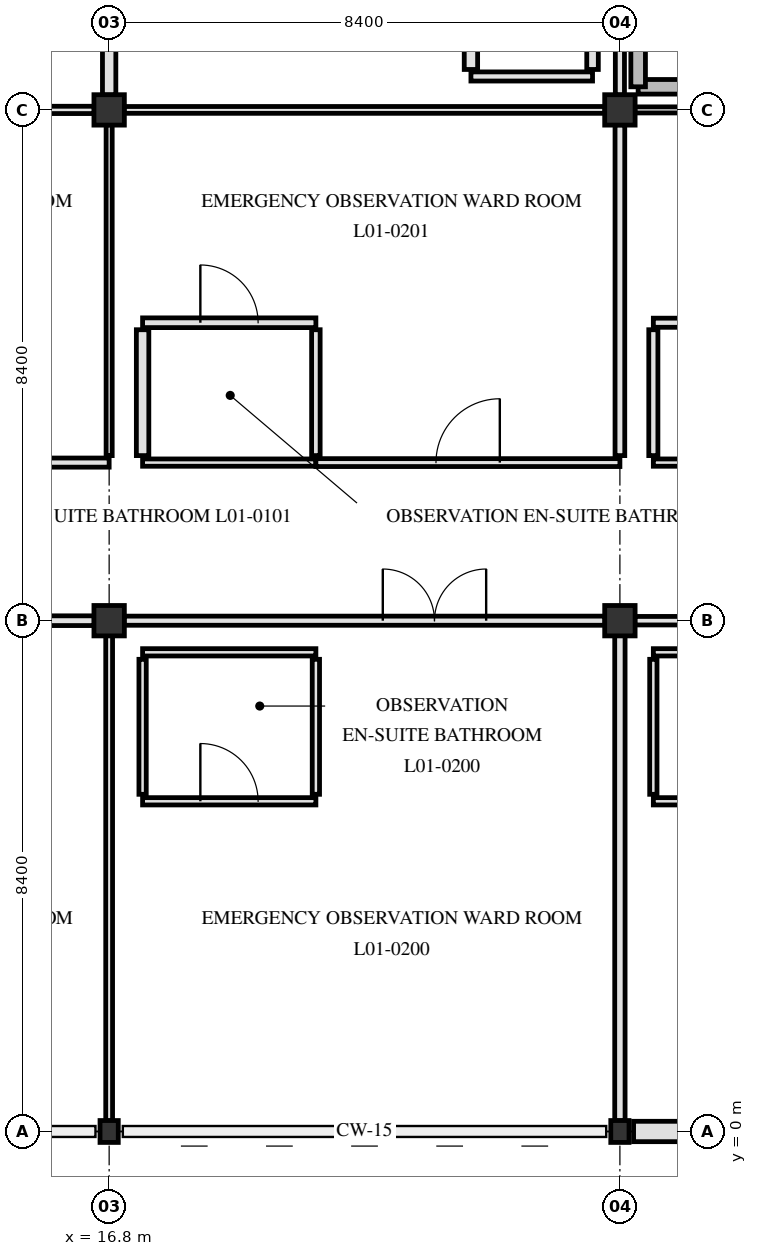
"""IFC4 building model, lengths in metres.
Left out: names, types, materials, properties, quantities, classifications, styles, units other than length and angle.
Written with IfcOpenShell. Run it as: python <this file> out.ifc"""

import sys

from ifc_helpers import new_model, si_unit, direction, frame, frame_2d, origin, origin_2d, place, context, subcontext, project, spatial, rectangle, i_section, extrude, element, fill, save


model = new_model("IFC4")
c1 = context("Model", 3, precision=1e-05, world=origin(), true_north=direction((0.0, 1.0)))
c2 = subcontext(c1, "Body", "Model", "MODEL_VIEW")
j1 = project(units=[si_unit("LENGTHUNIT", "METRE"), si_unit("PLANEANGLEUNIT", "RADIAN")], contexts=[c1])
p1 = place(None, origin())
s1 = spatial("IfcSite", under=j1, at=p1, CompositionType="ELEMENT")
p2 = place(p1, origin())
s2 = spatial("IfcBuilding", under=s1, at=p2, CompositionType="ELEMENT")
p3 = place(p2, frame((0.0, 0.0, 4.8)))
s3 = spatial("IfcBuildingStorey", under=s2, at=p3, CompositionType="ELEMENT", Elevation=4.8)
p4 = place(p3, frame((16.8, 0.0, 0.0), z_axis=(0.0, 0.0, 1.0), x_axis=(1.0, 0.0, 0.0)))
e1 = element("IfcColumn", 1, at=p4, inside=s3, PredefinedType="COLUMN", context=c2, shape_type="SweptSolid", body=[
    extrude(i_section(OverallWidth=0.3, OverallDepth=0.36, WebThickness=0.012, FlangeThickness=0.022, FilletRadius=0.027, at=origin_2d()), origin(), (0.0, 0.0, 1.0), 4.5),
])
for number, where, z_axis, x_axis in (
    (2, (16.8, 8.4, 0.0), (0.0, 0.0, 1.0), (1.0, 0.0, 0.0)),
    (3, (16.8, 16.8, 0.0), (0.0, 0.0, 1.0), (1.0, 0.0, 0.0)),
):
    element("IfcColumn", number, at=place(p3, frame(where, z_axis=z_axis, x_axis=x_axis)), inside=s3, PredefinedType="COLUMN", context=c2, shape_type="SweptSolid", body=[
        extrude(rectangle(XDim=0.5, YDim=0.5, at=origin_2d()), origin(), (0.0, 0.0, 1.0), 4.5),
    ])
p5 = place(p3, frame((25.2, 0.0, 0.0), z_axis=(0.0, 0.0, 1.0), x_axis=(1.0, 0.0, 0.0)))
e4 = element("IfcColumn", 4, at=p5, inside=s3, PredefinedType="COLUMN", context=c2, shape_type="SweptSolid", body=[
    extrude(i_section(OverallWidth=0.3, OverallDepth=0.36, WebThickness=0.012, FlangeThickness=0.022, FilletRadius=0.027, at=origin_2d()), origin(), (0.0, 0.0, 1.0), 4.5),
])
for number, where, z_axis, x_axis in (
    (5, (25.2, 8.4, 0.0), (0.0, 0.0, 1.0), (1.0, 0.0, 0.0)),
    (6, (25.2, 16.8, 0.0), (0.0, 0.0, 1.0), (1.0, 0.0, 0.0)),
):
    element("IfcColumn", number, at=place(p3, frame(where, z_axis=z_axis, x_axis=x_axis)), inside=s3, PredefinedType="COLUMN", context=c2, shape_type="SweptSolid", body=[
        extrude(rectangle(XDim=0.5, YDim=0.5, at=origin_2d()), origin(), (0.0, 0.0, 1.0), 4.5),
    ])
p6 = place(p3, frame((33.375, 0.0, 0.0), z_axis=(0.0, 0.0, 1.0), x_axis=(-1.0, 0.0, 0.0)))
e7 = element("IfcWall", 7, at=p6, inside=s3, PredefinedType="SOLIDWALL", context=c2, shape_type="SweptSolid", body=[
    extrude(rectangle(XDim=7.95, YDim=0.335, at=frame_2d((3.975, 0.0))), origin(), (0.0, 0.0, 1.0), 3.44),
])
p7 = place(p6, frame((1.038, 0.0, 0.85)))
e8 = element("IfcOpeningElement", 8, at=p7, cuts=e7, PredefinedType="OPENING", context=c2, shape_type="SweptSolid", body=[
    extrude(rectangle(XDim=1.9, YDim=1.78, at=frame_2d((0.95, 0.89))), frame((0.0, 0.177, 0.0), z_axis=(0.0, -1.0, 0.0), x_axis=(1.0, 0.0, 0.0)), (0.0, 0.0, 1.0), 0.355),
])
p8 = place(p6, frame((5.488, 0.0, 0.85)))
e9 = element("IfcOpeningElement", 9, at=p8, cuts=e7, PredefinedType="OPENING", context=c2, shape_type="SweptSolid", body=[
    extrude(rectangle(XDim=0.95, YDim=1.3, at=frame_2d((0.475, 0.65))), frame((0.0, 0.177, 0.0), z_axis=(0.0, -1.0, 0.0), x_axis=(1.0, 0.0, 0.0)), (0.0, 0.0, 1.0), 0.355),
])
p9 = place(p3, frame((25.5, 17.18, 0.0), z_axis=(0.0, 0.0, 1.0), x_axis=(1.0, 0.0, 0.0)))
e10 = element("IfcWall", 10, at=p9, inside=s3, PredefinedType="SHEAR", context=c2, shape_type="SweptSolid", body=[
    extrude(rectangle(XDim=7.82, YDim=0.24, at=frame_2d((3.91, 0.0))), origin(), (0.0, 0.0, 1.0), 4.15),
])
p10 = place(p3, frame((25.5, 17.18, 0.0), z_axis=(0.0, 0.0, 1.0), x_axis=(0.0, 1.0, 0.0)))
e11 = element("IfcWall", 11, at=p10, inside=s3, PredefinedType="SHEAR", context=c2, shape_type="SweptSolid", body=[
    extrude(rectangle(XDim=3.32, YDim=0.24, at=frame_2d((1.66, 0.0))), origin(), (0.0, 0.0, 1.0), 4.15),
])
p11 = place(p3, frame((17.35, 5.43, 0.0), z_axis=(0.0, 0.0, 1.0), x_axis=(1.0, 0.0, 0.0)))
e12 = element("IfcWall", 12, at=p11, inside=s3, PredefinedType="PARTITIONING", context=c2, shape_type="SweptSolid", body=[
    extrude(rectangle(XDim=2.85, YDim=0.12, at=frame_2d((1.425, 0.0))), origin(), (0.0, 0.0, 1.0), 4.14),
])
p12 = place(p11, frame((0.95, 0.0, 0.0)))
e13 = element("IfcOpeningElement", 13, at=p12, cuts=e12, PredefinedType="OPENING", context=c2, shape_type="SweptSolid", body=[
    extrude(rectangle(XDim=0.95, YDim=2.1, at=frame_2d((0.475, 1.05))), frame((0.0, 0.07, 0.0), z_axis=(0.0, -1.0, 0.0), x_axis=(1.0, 0.0, 0.0)), (0.0, 0.0, 1.0), 0.14),
])
p13 = place(p3, frame((25.75, 5.43, 0.0), z_axis=(0.0, 0.0, 1.0), x_axis=(1.0, 0.0, 0.0)))
e14 = element("IfcWall", 14, at=p13, inside=s3, PredefinedType="PARTITIONING", context=c2, shape_type="SweptSolid", body=[
    extrude(rectangle(XDim=2.85, YDim=0.12, at=frame_2d((1.425, 0.0))), origin(), (0.0, 0.0, 1.0), 4.14),
])
p14 = place(p13, frame((0.95, 0.0, 0.0)))
e15 = element("IfcOpeningElement", 15, at=p14, cuts=e14, PredefinedType="OPENING", context=c2, shape_type="SweptSolid", body=[
    extrude(rectangle(XDim=0.95, YDim=2.1, at=frame_2d((0.475, 1.05))), frame((0.0, 0.07, 0.0), z_axis=(0.0, -1.0, 0.0), x_axis=(1.0, 0.0, 0.0)), (0.0, 0.0, 1.0), 0.14),
])
p15 = place(p3, frame((17.35, 7.88, 0.0), z_axis=(0.0, 0.0, 1.0), x_axis=(1.0, 0.0, 0.0)))
e16 = element("IfcWall", 16, at=p15, inside=s3, PredefinedType="PARTITIONING", context=c2, shape_type="SweptSolid", body=[
    extrude(rectangle(XDim=2.85, YDim=0.12, at=frame_2d((1.425, 0.0))), origin(), (0.0, 0.0, 1.0), 4.14),
])
p16 = place(p3, frame((25.75, 7.88, 0.0), z_axis=(0.0, 0.0, 1.0), x_axis=(1.0, 0.0, 0.0)))
e17 = element("IfcWall", 17, at=p16, inside=s3, PredefinedType="PARTITIONING", context=c2, shape_type="SweptSolid", body=[
    extrude(rectangle(XDim=2.85, YDim=0.12, at=frame_2d((1.425, 0.0))), origin(), (0.0, 0.0, 1.0), 4.14),
])
p17 = place(p3, frame((8.645, 8.4, 0.0), z_axis=(0.0, 0.0, 1.0), x_axis=(1.0, 0.0, 0.0)))
e18 = element("IfcWall", 18, at=p17, inside=s3, PredefinedType="PARTITIONING", context=c2, shape_type="SweptSolid", body=[
    extrude(rectangle(XDim=7.91, YDim=0.16, at=frame_2d((3.955, 0.0))), origin(), (0.0, 0.0, 1.0), 3.54),
])
p18 = place(p17, frame((4.285, 0.0, 0.0)))
e19 = element("IfcOpeningElement", 19, at=p18, cuts=e18, PredefinedType="OPENING", context=c2, shape_type="SweptSolid", body=[
    extrude(rectangle(XDim=1.64, YDim=2.28, at=frame_2d((0.82, 1.14))), frame((0.0, 0.09, 0.0), z_axis=(0.0, -1.0, 0.0), x_axis=(1.0, 0.0, 0.0)), (0.0, 0.0, 1.0), 0.18),
])
p19 = place(p3, frame((17.045, 8.4, 0.0), z_axis=(0.0, 0.0, 1.0), x_axis=(1.0, 0.0, 0.0)))
e20 = element("IfcWall", 20, at=p19, inside=s3, PredefinedType="PARTITIONING", context=c2, shape_type="SweptSolid", body=[
    extrude(rectangle(XDim=7.91, YDim=0.15, at=frame_2d((3.955, 0.0))), origin(), (0.0, 0.0, 1.0), 3.54),
])
p20 = place(p19, frame((4.256, 0.0, 0.0)))
e21 = element("IfcOpeningElement", 21, at=p20, cuts=e20, PredefinedType="OPENING", context=c2, shape_type="SweptSolid", body=[
    extrude(rectangle(XDim=1.7, YDim=2.25, at=frame_2d((0.85, 1.125))), frame((0.0, 0.085, 0.0), z_axis=(0.0, -1.0, 0.0), x_axis=(1.0, 0.0, 0.0)), (0.0, 0.0, 1.0), 0.17),
])
p21 = place(p3, frame((25.445, 8.4, 0.0), z_axis=(0.0, 0.0, 1.0), x_axis=(1.0, 0.0, 0.0)))
e22 = element("IfcWall", 22, at=p21, inside=s3, PredefinedType="PARTITIONING", context=c2, shape_type="SweptSolid", body=[
    extrude(rectangle(XDim=7.91, YDim=0.14, at=frame_2d((3.955, 0.0))), origin(), (0.0, 0.0, 1.0), 3.54),
])
p22 = place(p21, frame((3.465, 0.0, 0.0)))
e23 = element("IfcOpeningElement", 23, at=p22, cuts=e22, PredefinedType="OPENING", context=c2, shape_type="SweptSolid", body=[
    extrude(rectangle(XDim=0.98, YDim=2.12, at=frame_2d((0.49, 1.06))), frame((0.0, 0.08, 0.0), z_axis=(0.0, -1.0, 0.0), x_axis=(1.0, 0.0, 0.0)), (0.0, 0.0, 1.0), 0.16),
])
p23 = place(p3, frame((11.8, 11.0, 0.0), z_axis=(0.0, 0.0, 1.0), x_axis=(1.0, 0.0, 0.0)))
e24 = element("IfcWall", 24, at=p23, inside=s3, PredefinedType="PARTITIONING", context=c2, shape_type="SweptSolid", body=[
    extrude(rectangle(XDim=5.0, YDim=0.15, at=frame_2d((2.5, 0.0))), origin(), (0.0, 0.0, 1.0), 3.59),
])
p24 = place(p23, frame((1.58, 0.0, 0.0)))
e25 = element("IfcOpeningElement", 25, at=p24, cuts=e24, PredefinedType="OPENING", context=c2, shape_type="SweptSolid", body=[
    extrude(rectangle(XDim=1.84, YDim=2.28, at=frame_2d((0.92, 1.14))), frame((0.0, 0.085, 0.0), z_axis=(0.0, -1.0, 0.0), x_axis=(1.0, 0.0, 0.0)), (0.0, 0.0, 1.0), 0.17),
])
p25 = place(p3, frame((17.35, 11.0, 0.0), z_axis=(0.0, 0.0, 1.0), x_axis=(1.0, 0.0, 0.0)))
e26 = element("IfcWall", 26, at=p25, inside=s3, PredefinedType="PARTITIONING", context=c2, shape_type="SweptSolid", body=[
    extrude(rectangle(XDim=2.85, YDim=0.12, at=frame_2d((1.425, 0.0))), origin(), (0.0, 0.0, 1.0), 4.14),
])
p26 = place(p3, frame((20.2, 11.0, 0.0), z_axis=(0.0, 0.0, 1.0), x_axis=(1.0, 0.0, 0.0)))
e27 = element("IfcWall", 27, at=p26, inside=s3, PredefinedType="PARTITIONING", context=c2, shape_type="SweptSolid", body=[
    extrude(rectangle(XDim=5.0, YDim=0.13, at=frame_2d((2.5, 0.0))), origin(), (0.0, 0.0, 1.0), 3.59),
])
p27 = place(p26, frame((1.975, 0.0, 0.0)))
e28 = element("IfcOpeningElement", 28, at=p27, cuts=e27, PredefinedType="OPENING", context=c2, shape_type="SweptSolid", body=[
    extrude(rectangle(XDim=1.05, YDim=2.15, at=frame_2d((0.525, 1.075))), frame((0.0, 0.075, 0.0), z_axis=(0.0, -1.0, 0.0), x_axis=(1.0, 0.0, 0.0)), (0.0, 0.0, 1.0), 0.15),
])
p28 = place(p3, frame((25.75, 11.0, 0.0), z_axis=(0.0, 0.0, 1.0), x_axis=(1.0, 0.0, 0.0)))
e29 = element("IfcWall", 29, at=p28, inside=s3, PredefinedType="PARTITIONING", context=c2, shape_type="SweptSolid", body=[
    extrude(rectangle(XDim=2.85, YDim=0.12, at=frame_2d((1.425, 0.0))), origin(), (0.0, 0.0, 1.0), 4.14),
])
p29 = place(p3, frame((17.35, 13.3, 0.0), z_axis=(0.0, 0.0, 1.0), x_axis=(1.0, 0.0, 0.0)))
e30 = element("IfcWall", 30, at=p29, inside=s3, PredefinedType="PARTITIONING", context=c2, shape_type="SweptSolid", body=[
    extrude(rectangle(XDim=2.85, YDim=0.16, at=frame_2d((1.425, 0.0))), origin(), (0.0, 0.0, 1.0), 4.14),
])
p30 = place(p29, frame((0.95, 0.0, 0.0)))
e31 = element("IfcOpeningElement", 31, at=p30, cuts=e30, PredefinedType="OPENING", context=c2, shape_type="SweptSolid", body=[
    extrude(rectangle(XDim=0.95, YDim=2.1, at=frame_2d((0.475, 1.05))), frame((0.0, 0.09, 0.0), z_axis=(0.0, -1.0, 0.0), x_axis=(1.0, 0.0, 0.0)), (0.0, 0.0, 1.0), 0.18),
])
p31 = place(p3, frame((25.75, 13.3, 0.0), z_axis=(0.0, 0.0, 1.0), x_axis=(1.0, 0.0, 0.0)))
e32 = element("IfcWall", 32, at=p31, inside=s3, PredefinedType="PARTITIONING", context=c2, shape_type="SweptSolid", body=[
    extrude(rectangle(XDim=2.85, YDim=0.15, at=frame_2d((1.425, 0.0))), origin(), (0.0, 0.0, 1.0), 4.14),
])
p32 = place(p31, frame((0.95, 0.0, 0.0)))
e33 = element("IfcOpeningElement", 33, at=p32, cuts=e32, PredefinedType="OPENING", context=c2, shape_type="SweptSolid", body=[
    extrude(rectangle(XDim=0.95, YDim=2.1, at=frame_2d((0.475, 1.05))), frame((0.0, 0.085, 0.0), z_axis=(0.0, -1.0, 0.0), x_axis=(1.0, 0.0, 0.0)), (0.0, 0.0, 1.0), 0.17),
])
p33 = place(p3, frame((8.645, 16.8, 0.0), z_axis=(0.0, 0.0, 1.0), x_axis=(1.0, 0.0, 0.0)))
e34 = element("IfcWall", 34, at=p33, inside=s3, PredefinedType="PARTITIONING", context=c2, shape_type="SweptSolid", body=[
    extrude(rectangle(XDim=7.91, YDim=0.12, at=frame_2d((3.955, 0.0))), origin(), (0.0, 0.0, 1.0), 3.54),
])
p34 = place(p3, frame((17.045, 16.8, 0.0), z_axis=(0.0, 0.0, 1.0), x_axis=(1.0, 0.0, 0.0)))
e35 = element("IfcWall", 35, at=p34, inside=s3, PredefinedType="PARTITIONING", context=c2, shape_type="SweptSolid", body=[
    extrude(rectangle(XDim=7.91, YDim=0.112, at=frame_2d((3.955, 0.0))), origin(), (0.0, 0.0, 1.0), 3.54),
])
p35 = place(p3, frame((25.445, 16.8, 0.0), z_axis=(0.0, 0.0, 1.0), x_axis=(1.0, 0.0, 0.0)))
e36 = element("IfcWall", 36, at=p35, inside=s3, PredefinedType="PARTITIONING", context=c2, shape_type="SweptSolid", body=[
    extrude(rectangle(XDim=7.91, YDim=0.1, at=frame_2d((3.955, 0.0))), origin(), (0.0, 0.0, 1.0), 3.54),
])
p36 = place(p3, frame((22.75, 17.35, 0.0), z_axis=(0.0, 0.0, 1.0), x_axis=(1.0, 0.0, 0.0)))
e37 = element("IfcWall", 37, at=p36, inside=s3, PredefinedType="PARTITIONING", context=c2, shape_type="SweptSolid", body=[
    extrude(rectangle(XDim=2.0, YDim=0.15, at=frame_2d((1.0, 0.0))), origin(), (0.0, 0.0, 1.0), 4.14),
])
p37 = place(p3, frame((16.8, 0.175, 0.0), z_axis=(0.0, 0.0, 1.0), x_axis=(0.0, 1.0, 0.0)))
e38 = element("IfcWall", 38, at=p37, inside=s3, PredefinedType="PARTITIONING", context=c2, shape_type="SweptSolid", body=[
    extrude(rectangle(XDim=7.98, YDim=0.112, at=frame_2d((3.99, 0.0))), origin(), (0.0, 0.0, 1.0), 3.59),
])
p38 = place(p3, frame((16.8, 11.115, 0.0), z_axis=(0.0, 0.0, 1.0), x_axis=(0.0, 1.0, 0.0)))
e39 = element("IfcWall", 39, at=p38, inside=s3, PredefinedType="PARTITIONING", context=c2, shape_type="SweptSolid", body=[
    extrude(rectangle(XDim=5.44, YDim=0.1, at=frame_2d((2.72, 0.0))), origin(), (0.0, 0.0, 1.0), 3.59),
])
p39 = place(p3, frame((16.8, 17.045, 0.0), z_axis=(0.0, 0.0, 1.0), x_axis=(0.0, 1.0, 0.0)))
e40 = element("IfcWall", 40, at=p39, inside=s3, PredefinedType="PARTITIONING", context=c2, shape_type="SweptSolid", body=[
    extrude(rectangle(XDim=5.44, YDim=0.22, at=frame_2d((2.72, 0.0))), origin(), (0.0, 0.0, 1.0), 3.59),
])
p40 = place(p3, frame((17.35, 5.545, 0.0), z_axis=(0.0, 0.0, 1.0), x_axis=(0.0, 1.0, 0.0)))
e41 = element("IfcWall", 41, at=p40, inside=s3, PredefinedType="PARTITIONING", context=c2, shape_type="SweptSolid", body=[
    extrude(rectangle(XDim=2.22, YDim=0.12, at=frame_2d((1.11, 0.0))), origin(), (0.0, 0.0, 1.0), 4.14),
])
p41 = place(p3, frame((17.35, 11.115, 0.0), z_axis=(0.0, 0.0, 1.0), x_axis=(0.0, 1.0, 0.0)))
e42 = element("IfcWall", 42, at=p41, inside=s3, PredefinedType="PARTITIONING", context=c2, shape_type="SweptSolid", body=[
    extrude(rectangle(XDim=2.07, YDim=0.205, at=frame_2d((1.035, 0.0))), origin(), (0.0, 0.0, 1.0), 4.14),
])
p42 = place(p3, frame((20.2, 5.545, 0.0), z_axis=(0.0, 0.0, 1.0), x_axis=(0.0, 1.0, 0.0)))
e43 = element("IfcWall", 43, at=p42, inside=s3, PredefinedType="PARTITIONING", context=c2, shape_type="SweptSolid", body=[
    extrude(rectangle(XDim=2.22, YDim=0.12, at=frame_2d((1.11, 0.0))), origin(), (0.0, 0.0, 1.0), 4.14),
])
p43 = place(p3, frame((20.2, 11.115, 0.0), z_axis=(0.0, 0.0, 1.0), x_axis=(0.0, 1.0, 0.0)))
e44 = element("IfcWall", 44, at=p43, inside=s3, PredefinedType="PARTITIONING", context=c2, shape_type="SweptSolid", body=[
    extrude(rectangle(XDim=2.07, YDim=0.14, at=frame_2d((1.035, 0.0))), origin(), (0.0, 0.0, 1.0), 4.14),
])
p44 = place(p3, frame((22.75, 17.465, 0.0), z_axis=(0.0, 0.0, 1.0), x_axis=(0.0, 1.0, 0.0)))
e45 = element("IfcWall", 45, at=p44, inside=s3, PredefinedType="PARTITIONING", context=c2, shape_type="SweptSolid", body=[
    extrude(rectangle(XDim=5.02, YDim=0.22, at=frame_2d((2.51, 0.0))), origin(), (0.0, 0.0, 1.0), 4.14),
])
p45 = place(p3, frame((24.75, 17.465, 0.0), z_axis=(0.0, 0.0, 1.0), x_axis=(0.0, 1.0, 0.0)))
e46 = element("IfcWall", 46, at=p45, inside=s3, PredefinedType="PARTITIONING", context=c2, shape_type="SweptSolid", body=[
    extrude(rectangle(XDim=5.135, YDim=0.19, at=frame_2d((2.567, 0.0))), origin(), (0.0, 0.0, 1.0), 4.14),
])
p46 = place(p3, frame((25.2, 0.175, 0.0), z_axis=(0.0, 0.0, 1.0), x_axis=(0.0, 1.0, 0.0)))
e47 = element("IfcWall", 47, at=p46, inside=s3, PredefinedType="PARTITIONING", context=c2, shape_type="SweptSolid", body=[
    extrude(rectangle(XDim=7.98, YDim=0.17, at=frame_2d((3.99, 0.0))), origin(), (0.0, 0.0, 1.0), 3.59),
])
p47 = place(p3, frame((25.2, 11.115, 0.0), z_axis=(0.0, 0.0, 1.0), x_axis=(0.0, 1.0, 0.0)))
e48 = element("IfcWall", 48, at=p47, inside=s3, PredefinedType="PARTITIONING", context=c2, shape_type="SweptSolid", body=[
    extrude(rectangle(XDim=5.44, YDim=0.16, at=frame_2d((2.72, 0.0))), origin(), (0.0, 0.0, 1.0), 3.59),
])
p48 = place(p3, frame((25.2, 17.045, 0.0), z_axis=(0.0, 0.0, 1.0), x_axis=(0.0, 1.0, 0.0)))
e49 = element("IfcWall", 49, at=p48, inside=s3, PredefinedType="PARTITIONING", context=c2, shape_type="SweptSolid", body=[
    extrude(rectangle(XDim=5.555, YDim=0.15, at=frame_2d((2.778, 0.0))), origin(), (0.0, 0.0, 1.0), 3.59),
])
p49 = place(p3, frame((25.75, 5.545, 0.0), z_axis=(0.0, 0.0, 1.0), x_axis=(0.0, 1.0, 0.0)))
e50 = element("IfcWall", 50, at=p49, inside=s3, PredefinedType="PARTITIONING", context=c2, shape_type="SweptSolid", body=[
    extrude(rectangle(XDim=2.22, YDim=0.12, at=frame_2d((1.11, 0.0))), origin(), (0.0, 0.0, 1.0), 4.14),
])
p50 = place(p3, frame((25.75, 11.115, 0.0), z_axis=(0.0, 0.0, 1.0), x_axis=(0.0, 1.0, 0.0)))
e51 = element("IfcWall", 51, at=p50, inside=s3, PredefinedType="PARTITIONING", context=c2, shape_type="SweptSolid", body=[
    extrude(rectangle(XDim=2.07, YDim=0.15, at=frame_2d((1.035, 0.0))), origin(), (0.0, 0.0, 1.0), 4.14),
])
p51 = place(p20, origin())
e52 = element("IfcDoor", 52, at=p51, inside=s3, OperationType="DOUBLE_SWING_RIGHT", PredefinedType="DOOR", context=c2, shape_type="SweptSolid", body=[
    extrude(rectangle(XDim=1.7, YDim=2.25, at=frame_2d((0.85, 1.125))), frame((0.0, 0.025, 0.0), z_axis=(0.0, -1.0, 0.0), x_axis=(1.0, 0.0, 0.0)), (0.0, 0.0, 1.0), 0.05),
])
fill(e21, e52)
p52 = place(p12, origin())
e53 = element("IfcDoor", 53, at=p52, inside=s3, OperationType="SINGLE_SWING_LEFT", PredefinedType="DOOR", context=c2, shape_type="SweptSolid", body=[
    extrude(rectangle(XDim=0.95, YDim=2.1, at=frame_2d((0.475, 1.05))), frame((0.0, 0.025, 0.0), z_axis=(0.0, -1.0, 0.0), x_axis=(1.0, 0.0, 0.0)), (0.0, 0.0, 1.0), 0.05),
])
fill(e13, e53)
p53 = place(p27, origin())
e54 = element("IfcDoor", 54, at=p53, inside=s3, OperationType="SINGLE_SWING_RIGHT", PredefinedType="DOOR", context=c2, shape_type="SweptSolid", body=[
    extrude(rectangle(XDim=1.05, YDim=2.15, at=frame_2d((0.525, 1.075))), frame((0.0, 0.025, 0.0), z_axis=(0.0, -1.0, 0.0), x_axis=(1.0, 0.0, 0.0)), (0.0, 0.0, 1.0), 0.05),
])
fill(e28, e54)
p54 = place(p30, origin())
e55 = element("IfcDoor", 55, at=p54, inside=s3, OperationType="SINGLE_SWING_LEFT", PredefinedType="DOOR", context=c2, shape_type="SweptSolid", body=[
    extrude(rectangle(XDim=0.95, YDim=2.1, at=frame_2d((0.475, 1.05))), frame((0.0, 0.025, 0.0), z_axis=(0.0, -1.0, 0.0), x_axis=(1.0, 0.0, 0.0)), (0.0, 0.0, 1.0), 0.05),
])
fill(e31, e55)
save(model, sys.argv[1])
